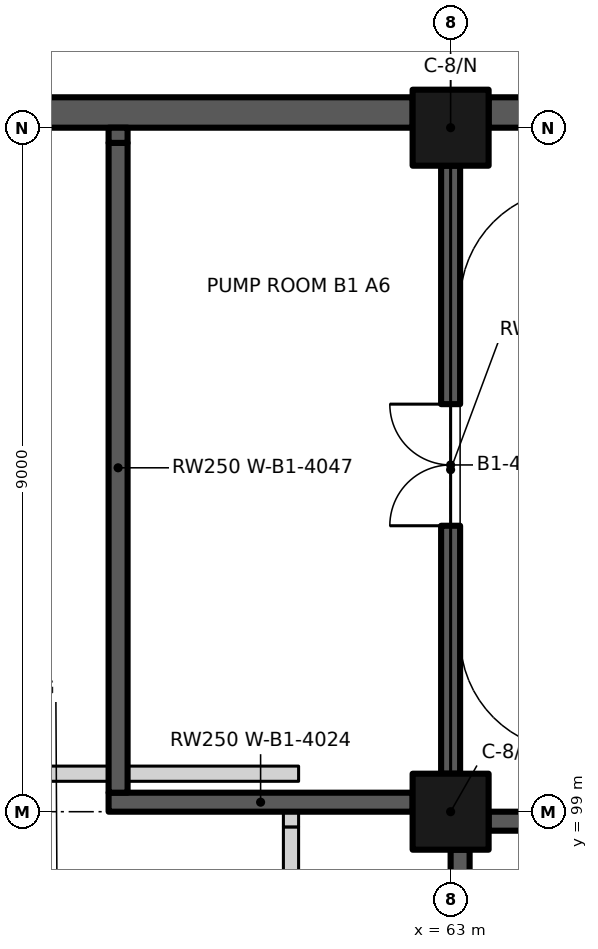
"""IFC4 building model, lengths in metres.
Left out: names, types, materials, properties, quantities, classifications, styles, units other than length and angle.
Written with IfcOpenShell. Run it as: python <this file> out.ifc"""

import sys

from ifc_helpers import new_model, si_unit, direction, frame, frame_2d, origin, origin_2d, place, context, subcontext, project, spatial, rectangle, extrude, element, fill, save


model = new_model("IFC4")
c1 = context("Model", 3, precision=1e-05, world=origin(), true_north=direction((0.0, 1.0)))
c2 = subcontext(c1, "Body", "Model", "MODEL_VIEW")
j1 = project(units=[si_unit("LENGTHUNIT", "METRE"), si_unit("PLANEANGLEUNIT", "RADIAN")], contexts=[c1])
p1 = place(None, origin())
s1 = spatial("IfcSite", under=j1, at=p1, CompositionType="ELEMENT")
p2 = place(p1, origin())
s2 = spatial("IfcBuilding", under=s1, at=p2, CompositionType="ELEMENT")
p3 = place(p2, frame((0.0, 0.0, -5.1)))
s3 = spatial("IfcBuildingStorey", under=s2, at=p3, CompositionType="ELEMENT", Elevation=-5.1)
p4 = place(p3, frame((54.5, 108.2, 0.0), z_axis=(0.0, 0.0, 1.0), x_axis=(1.0, 0.0, 0.0)))
e1 = element("IfcWall", 1, at=p4, inside=s3, PredefinedType="SOLIDWALL", context=c2, shape_type="SweptSolid", body=[
    extrude(rectangle(XDim=8.0, YDim=0.4, at=frame_2d((4.0, 0.0))), origin(), (0.0, 0.0, 1.0), 5.1),
])
p5 = place(p3, frame((63.5, 108.2, 0.0), z_axis=(0.0, 0.0, 1.0), x_axis=(1.0, 0.0, 0.0)))
e2 = element("IfcWall", 2, at=p5, inside=s3, PredefinedType="SOLIDWALL", context=c2, shape_type="SweptSolid", body=[
    extrude(rectangle(XDim=8.05, YDim=0.4, at=frame_2d((4.025, 0.0))), origin(), (0.0, 0.0, 1.0), 5.1),
])
for number, where, z_axis, x_axis in (
    (3, (63.0, 99.0, 0.0), (0.0, 0.0, 1.0), (1.0, 0.0, 0.0)),
    (4, (63.0, 108.0, 0.0), (0.0, 0.0, 1.0), (1.0, 0.0, 0.0)),
):
    element("IfcColumn", number, at=place(p3, frame(where, z_axis=z_axis, x_axis=x_axis)), inside=s3, PredefinedType="COLUMN", context=c2, shape_type="SweptSolid", body=[
        extrude(rectangle(XDim=1.0, YDim=1.0, at=origin_2d()), origin(), (0.0, 0.0, 1.0), 5.1),
    ])
p6 = place(p3, frame((63.5, 98.875, 0.0), z_axis=(0.0, 0.0, 1.0), x_axis=(1.0, 0.0, 0.0)))
e5 = element("IfcWall", 5, at=p6, inside=s3, PredefinedType="SHEAR", context=c2, shape_type="SweptSolid", body=[
    extrude(rectangle(XDim=1.75, YDim=0.25, at=frame_2d((0.875, 0.0))), origin(), (0.0, 0.0, 1.0), 5.1),
])
p7 = place(p3, frame((63.125, 90.5, 0.0), z_axis=(0.0, 0.0, 1.0), x_axis=(0.0, 1.0, 0.0)))
e6 = element("IfcWall", 6, at=p7, inside=s3, PredefinedType="SHEAR", context=c2, shape_type="SweptSolid", body=[
    extrude(rectangle(XDim=8.0, YDim=0.25, at=frame_2d((4.0, 0.0))), origin(), (0.0, 0.0, 1.0), 5.1),
])
p8 = place(p3, frame((58.5, 99.125, 0.0), z_axis=(0.0, 0.0, 1.0), x_axis=(1.0, 0.0, 0.0)))
e7 = element("IfcWall", 7, at=p8, inside=s3, PredefinedType="SOLIDWALL", context=c2, shape_type="SweptSolid", body=[
    extrude(rectangle(XDim=4.0, YDim=0.25, at=frame_2d((2.0, 0.0))), origin(), (0.0, 0.0, 1.0), 4.3),
])
p9 = place(p3, frame((54.65, 99.5, 0.0), z_axis=(0.0, 0.0, 1.0), x_axis=(1.0, 0.0, 0.0)))
e8 = element("IfcWall", 8, at=p9, inside=s3, PredefinedType="PARTITIONING", context=c2, shape_type="SweptSolid", body=[
    extrude(rectangle(XDim=3.85, YDim=0.2, at=frame_2d((1.925, 0.0))), origin(), (0.0, 0.0, 1.0), 4.75),
])
p10 = place(p3, frame((58.75, 99.5, 0.0), z_axis=(0.0, 0.0, 1.0), x_axis=(1.0, 0.0, 0.0)))
e9 = element("IfcWall", 9, at=p10, inside=s3, PredefinedType="PARTITIONING", context=c2, shape_type="SweptSolid", body=[
    extrude(rectangle(XDim=2.25, YDim=0.2, at=frame_2d((1.125, 0.0))), origin(), (0.0, 0.0, 1.0), 4.75),
])
p11 = place(p3, frame((58.625, 99.25, 0.0), z_axis=(0.0, 0.0, 1.0), x_axis=(0.0, 1.0, 0.0)))
e10 = element("IfcWall", 10, at=p11, inside=s3, PredefinedType="SOLIDWALL", context=c2, shape_type="SweptSolid", body=[
    extrude(rectangle(XDim=8.55, YDim=0.25, at=frame_2d((4.275, 0.0))), origin(), (0.0, 0.0, 1.0), 4.75),
])
p12 = place(p3, frame((58.625, 107.8, 0.0), z_axis=(0.0, 0.0, 1.0), x_axis=(0.0, 1.0, 0.0)))
e11 = element("IfcWall", 11, at=p12, inside=s3, PredefinedType="SOLIDWALL", context=c2, shape_type="SweptSolid", body=[
    extrude(rectangle(XDim=0.2, YDim=0.25, at=frame_2d((0.1, 0.0))), origin(), (0.0, 0.0, 1.0), 4.3),
])
p13 = place(p3, frame((60.9, 95.8, 0.0), z_axis=(0.0, 0.0, 1.0), x_axis=(0.0, 1.0, 0.0)))
e12 = element("IfcWall", 12, at=p13, inside=s3, PredefinedType="PARTITIONING", context=c2, shape_type="SweptSolid", body=[
    extrude(rectangle(XDim=3.0, YDim=0.2, at=frame_2d((1.5, 0.0))), origin(), (0.0, 0.0, 1.0), 4.75),
])
p14 = place(p3, frame((60.9, 98.8, 0.0), z_axis=(0.0, 0.0, 1.0), x_axis=(0.0, 1.0, 0.0)))
e13 = element("IfcWall", 13, at=p14, inside=s3, PredefinedType="PARTITIONING", context=c2, shape_type="SweptSolid", body=[
    extrude(rectangle(XDim=0.2, YDim=0.2, at=frame_2d((0.1, 0.0))), origin(), (0.0, 0.0, 1.0), 4.3),
])
p15 = place(p3, frame((63.0, 99.5, 0.0), z_axis=(0.0, 0.0, 1.0), x_axis=(0.0, 1.0, 0.0)))
e14 = element("IfcWall", 14, at=p15, inside=s3, PredefinedType="SOLIDWALL", context=c2, shape_type="SweptSolid", body=[
    extrude(rectangle(XDim=8.0, YDim=0.25, at=frame_2d((4.0, 0.0))), origin(), (0.0, 0.0, 1.0), 4.3),
])
p16 = place(p15, frame((3.262, 0.0, 0.0)))
e15 = element("IfcOpeningElement", 15, at=p16, cuts=e14, PredefinedType="OPENING", context=c2, shape_type="SweptSolid", body=[
    extrude(rectangle(XDim=1.6, YDim=2.1, at=frame_2d((0.8, 1.05))), frame((0.0, 0.135, 0.0), z_axis=(0.0, -1.0, 0.0), x_axis=(1.0, 0.0, 0.0)), (0.0, 0.0, 1.0), 0.27),
])
p17 = place(p16, origin())
e16 = element("IfcDoor", 16, at=p17, inside=s3, OperationType="DOUBLE_DOOR_SINGLE_SWING", PredefinedType="DOOR", context=c2, shape_type="SweptSolid", body=[
    extrude(rectangle(XDim=1.6, YDim=2.1, at=frame_2d((0.8, 1.05))), frame((0.0, 0.025, 0.0), z_axis=(0.0, -1.0, 0.0), x_axis=(1.0, 0.0, 0.0)), (0.0, 0.0, 1.0), 0.05),
])
fill(e15, e16)
save(model, sys.argv[1])
